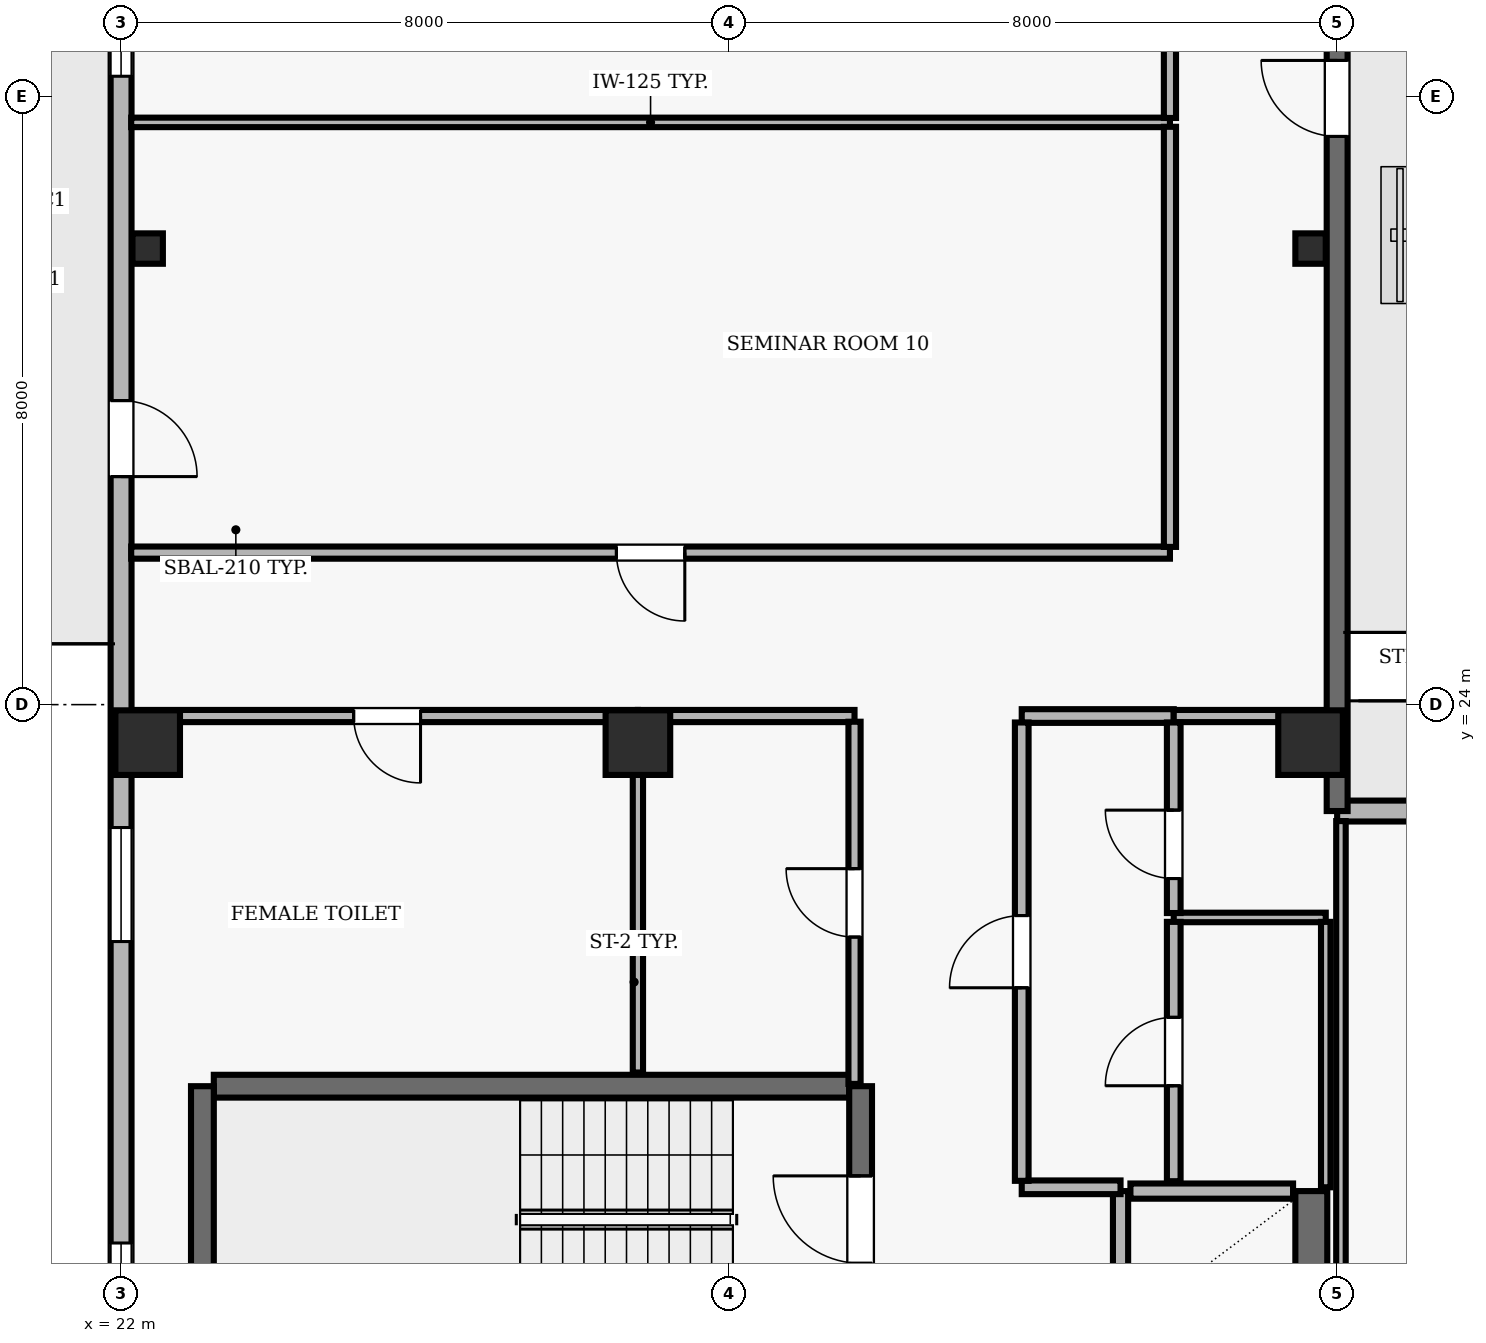
"""IFC4 building model, lengths in metres.
Left out: names, types, materials, properties, quantities, classifications, styles, units other than length and angle.
Written with IfcOpenShell. Run it as: python <this file> out.ifc"""

import sys

from ifc_helpers import new_model, si_unit, direction, frame, frame_2d, origin, origin_2d, place, context, subcontext, project, spatial, rectangle, hollow_rectangle, extrude, element, fill, save


model = new_model("IFC4")
c1 = context("Model", 3, precision=1e-05, world=origin(), true_north=direction((0.0, 1.0)))
c2 = subcontext(c1, "Body", "Model", "MODEL_VIEW")
j1 = project(units=[si_unit("LENGTHUNIT", "METRE"), si_unit("PLANEANGLEUNIT", "RADIAN")], contexts=[c1])
p1 = place(None, origin())
s1 = spatial("IfcSite", under=j1, at=p1, CompositionType="ELEMENT")
p2 = place(p1, origin())
s2 = spatial("IfcBuilding", under=s1, at=p2, CompositionType="ELEMENT")
p3 = place(p2, frame((0.0, 0.0, 267.7)))
s3 = spatial("IfcBuildingStorey", under=s2, at=p3, CompositionType="ELEMENT", Elevation=267.7)
for number, where, z_axis, x_axis in (
    (1, (22.35, 23.5, 0.0), (0.0, 0.0, 1.0), (1.0, 0.0, 0.0)),
    (2, (28.8, 23.5, 0.0), (0.0, 0.0, 1.0), (1.0, 0.0, 0.0)),
    (3, (37.65, 23.5, 0.0), (0.0, 0.0, 1.0), (1.0, 0.0, 0.0)),
):
    element("IfcColumn", number, at=place(p3, frame(where, z_axis=z_axis, x_axis=x_axis)), inside=s3, PredefinedType="COLUMN", context=c2, shape_type="SweptSolid", body=[
        extrude(rectangle(XDim=0.85, YDim=0.85, at=origin_2d()), origin(), (0.0, 0.0, 1.0), 3.9),
    ])
for number, where, z_axis, x_axis in (
    (4, (22.35, 30.0, 0.0), (0.0, 0.0, 1.0), (1.0, 0.0, 0.0)),
    (5, (37.65, 30.0, 0.0), (0.0, 0.0, 1.0), (1.0, 0.0, 0.0)),
):
    element("IfcColumn", number, at=place(p3, frame(where, z_axis=z_axis, x_axis=x_axis)), inside=s3, PredefinedType="COLUMN", context=c2, shape_type="SweptSolid", body=[
        extrude(hollow_rectangle(XDim=0.4, YDim=0.4, WallThickness=0.02, at=origin_2d()), origin(), (0.0, 0.0, 1.0), 3.9),
    ])
p4 = place(p3, frame((43.0, 22.6, 0.0), z_axis=(0.0, 0.0, 1.0), x_axis=(-1.0, 0.0, 0.0)))
e6 = element("IfcWall", 6, at=p4, inside=s3, PredefinedType="SOLIDWALL", context=c2, shape_type="SweptSolid", body=[
    extrude(rectangle(XDim=5.0, YDim=0.275, at=frame_2d((2.5, 0.0))), origin(), (0.0, 0.0, 1.0), 3.69),
])
p5 = place(p4, frame((1.825, 0.0, 0.0)))
e7 = element("IfcOpeningElement", 7, at=p5, cuts=e6, PredefinedType="OPENING", context=c2, shape_type="SweptSolid", body=[
    extrude(rectangle(XDim=1.35, YDim=2.2, at=frame_2d((0.675, 1.1))), frame((0.0, 0.147, 0.0), z_axis=(0.0, -1.0, 0.0), x_axis=(1.0, 0.0, 0.0)), (0.0, 0.0, 1.0), 0.295),
])
p6 = place(p3, frame((38.0, 22.6, 0.0), z_axis=(0.0, 0.0, 1.0), x_axis=(0.0, 1.0, 0.0)))
e8 = element("IfcWall", 8, at=p6, inside=s3, PredefinedType="SOLIDWALL", context=c2, shape_type="SweptSolid", body=[
    extrude(rectangle(XDim=12.7, YDim=0.275, at=frame_2d((6.35, 0.0))), origin(), (0.0, 0.0, 1.0), 3.69),
])
p7 = place(p6, frame((8.875, 0.0, 0.0)))
e9 = element("IfcOpeningElement", 9, at=p7, cuts=e8, PredefinedType="OPENING", context=c2, shape_type="SweptSolid", body=[
    extrude(rectangle(XDim=1.0, YDim=2.2, at=frame_2d((0.5, 1.1))), frame((0.0, 0.147, 0.0), z_axis=(0.0, -1.0, 0.0), x_axis=(1.0, 0.0, 0.0)), (0.0, 0.0, 1.0), 0.295),
])
p8 = place(p3, frame((22.0, 35.3, 0.0), z_axis=(0.0, 0.0, 1.0), x_axis=(0.0, -1.0, 0.0)))
e10 = element("IfcWall", 10, at=p8, inside=s3, PredefinedType="SOLIDWALL", context=c2, shape_type="SweptSolid", body=[
    extrude(rectangle(XDim=32.8, YDim=0.275, at=frame_2d((16.4, 0.0))), origin(), (0.0, 0.0, 1.0), 3.69),
])
p9 = place(p8, frame((7.3, 0.0, 0.0)))
e11 = element("IfcOpeningElement", 11, at=p9, cuts=e10, PredefinedType="OPENING", context=c2, shape_type="SweptSolid", body=[
    extrude(rectangle(XDim=1.0, YDim=2.2, at=frame_2d((0.5, 1.1))), frame((0.0, 0.147, 0.0), z_axis=(0.0, -1.0, 0.0), x_axis=(1.0, 0.0, 0.0)), (0.0, 0.0, 1.0), 0.295),
])
p10 = place(p8, frame((1.533, 0.0, 0.9)))
e12 = element("IfcOpeningElement", 12, at=p10, cuts=e10, PredefinedType="OPENING", context=c2, shape_type="SweptSolid", body=[
    extrude(rectangle(XDim=1.5, YDim=1.8, at=frame_2d((0.75, 0.9))), frame((0.0, 0.147, 0.0), z_axis=(0.0, -1.0, 0.0), x_axis=(1.0, 0.0, 0.0)), (0.0, 0.0, 1.0), 0.295),
])
p11 = place(p8, frame((12.917, 0.0, 0.9)))
e13 = element("IfcOpeningElement", 13, at=p11, cuts=e10, PredefinedType="OPENING", context=c2, shape_type="SweptSolid", body=[
    extrude(rectangle(XDim=1.5, YDim=1.8, at=frame_2d((0.75, 0.9))), frame((0.0, 0.147, 0.0), z_axis=(0.0, -1.0, 0.0), x_axis=(1.0, 0.0, 0.0)), (0.0, 0.0, 1.0), 0.295),
])
p12 = place(p8, frame((18.383, 0.0, 0.9)))
e14 = element("IfcOpeningElement", 14, at=p12, cuts=e10, PredefinedType="OPENING", context=c2, shape_type="SweptSolid", body=[
    extrude(rectangle(XDim=1.5, YDim=1.8, at=frame_2d((0.75, 0.9))), frame((0.0, 0.147, 0.0), z_axis=(0.0, -1.0, 0.0), x_axis=(1.0, 0.0, 0.0)), (0.0, 0.0, 1.0), 0.295),
])
p13 = place(p8, frame((23.85, 0.0, 0.9)))
e15 = element("IfcOpeningElement", 15, at=p13, cuts=e10, PredefinedType="OPENING", context=c2, shape_type="SweptSolid", body=[
    extrude(rectangle(XDim=1.5, YDim=1.8, at=frame_2d((0.75, 0.9))), frame((0.0, 0.147, 0.0), z_axis=(0.0, -1.0, 0.0), x_axis=(1.0, 0.0, 0.0)), (0.0, 0.0, 1.0), 0.295),
])
p14 = place(p3, frame((31.58, 18.98, 0.0), z_axis=(0.0, 0.0, 1.0), x_axis=(-1.0, 0.0, 0.0)))
e16 = element("IfcWall", 16, at=p14, inside=s3, PredefinedType="SHEAR", context=c2, shape_type="SweptSolid", body=[
    extrude(rectangle(XDim=8.36, YDim=0.3, at=frame_2d((4.18, 0.0))), origin(), (0.0, 0.0, 1.0), 3.69),
])
p15 = place(p3, frame((23.07, 18.98, 0.0), z_axis=(0.0, 0.0, 1.0), x_axis=(0.0, -1.0, 0.0)))
e17 = element("IfcWall", 17, at=p15, inside=s3, PredefinedType="SHEAR", context=c2, shape_type="SweptSolid", body=[
    extrude(rectangle(XDim=3.51, YDim=0.3, at=frame_2d((1.755, 0.0))), origin(), (0.0, 0.0, 1.0), 3.69),
])
p16 = place(p3, frame((31.73, 15.47, 0.0), z_axis=(0.0, 0.0, 1.0), x_axis=(0.0, 1.0, 0.0)))
e18 = element("IfcWall", 18, at=p16, inside=s3, PredefinedType="SHEAR", context=c2, shape_type="SweptSolid", body=[
    extrude(rectangle(XDim=3.51, YDim=0.3, at=frame_2d((1.755, 0.0))), origin(), (0.0, 0.0, 1.0), 3.69),
])
p17 = place(p16, frame((1.18, 0.0, 0.0)))
e19 = element("IfcOpeningElement", 19, at=p17, cuts=e18, PredefinedType="OPENING", context=c2, shape_type="SweptSolid", body=[
    extrude(rectangle(XDim=1.15, YDim=2.15, at=frame_2d((0.575, 1.075))), frame((0.0, 0.16, 0.0), z_axis=(0.0, -1.0, 0.0), x_axis=(1.0, 0.0, 0.0)), (0.0, 0.0, 1.0), 0.32),
])
p18 = place(p3, frame((35.15, 17.6, 0.0), z_axis=(0.0, 0.0, 1.0), x_axis=(0.0, -1.0, 0.0)))
e20 = element("IfcWall", 20, at=p18, inside=s3, PredefinedType="SOLIDWALL", context=c2, shape_type="SweptSolid", body=[
    extrude(rectangle(XDim=1.85, YDim=0.2, at=frame_2d((0.925, 0.0))), origin(), (0.0, 0.0, 1.0), 3.69),
])
p19 = place(p3, frame((37.66, 15.75, 0.0), z_axis=(0.0, 0.0, 1.0), x_axis=(0.0, 1.0, 0.0)))
e21 = element("IfcWall", 21, at=p19, inside=s3, PredefinedType="SHEAR", context=c2, shape_type="SweptSolid", body=[
    extrude(rectangle(XDim=1.85, YDim=0.42, at=frame_2d((0.925, 0.0))), origin(), (0.0, 0.0, 1.0), 3.69),
])
p20 = place(p3, frame((37.42, 17.6, 0.0), z_axis=(0.0, 0.0, 1.0), x_axis=(-1.0, 0.0, 0.0)))
e22 = element("IfcWall", 22, at=p20, inside=s3, PredefinedType="SOLIDWALL", context=c2, shape_type="SweptSolid", body=[
    extrude(rectangle(XDim=2.14, YDim=0.2, at=frame_2d((1.07, 0.0))), origin(), (0.0, 0.0, 1.0), 3.69),
])
p21 = place(p3, frame((28.8, 23.85, 0.0), z_axis=(0.0, 0.0, 1.0), x_axis=(-1.0, 0.0, 0.0)))
e23 = element("IfcWall", 23, at=p21, inside=s3, PredefinedType="PARTITIONING", context=c2, shape_type="SweptSolid", body=[
    extrude(rectangle(XDim=6.6, YDim=0.16, at=frame_2d((3.3, 0.0))), origin(), (0.0, 0.0, 1.0), 3.227),
])
p22 = place(p21, frame((2.86, 0.0, 0.0)))
e24 = element("IfcOpeningElement", 24, at=p22, cuts=e23, PredefinedType="OPENING", context=c2, shape_type="SweptSolid", body=[
    extrude(rectangle(XDim=0.88, YDim=2.1, at=frame_2d((0.44, 1.05))), frame((0.0, 0.09, 0.0), z_axis=(0.0, -1.0, 0.0), x_axis=(1.0, 0.0, 0.0)), (0.0, 0.0, 1.0), 0.18),
])
p23 = place(p3, frame((31.65, 23.85, 0.0), z_axis=(0.0, 0.0, 1.0), x_axis=(-1.0, 0.0, 0.0)))
e25 = element("IfcWall", 25, at=p23, inside=s3, PredefinedType="PARTITIONING", context=c2, shape_type="SweptSolid", body=[
    extrude(rectangle(XDim=2.85, YDim=0.16, at=frame_2d((1.425, 0.0))), origin(), (0.0, 0.0, 1.0), 3.227),
])
p24 = place(p3, frame((33.85, 17.65, 0.0), z_axis=(0.0, 0.0, 1.0), x_axis=(1.0, 0.0, 0.0)))
e26 = element("IfcWall", 26, at=p24, inside=s3, PredefinedType="PARTITIONING", context=c2, shape_type="SweptSolid", body=[
    extrude(rectangle(XDim=1.3, YDim=0.18, at=frame_2d((0.65, 0.0))), origin(), (0.0, 0.0, 1.0), 3.69),
])
p25 = place(p3, frame((35.8, 26.0, 0.0), z_axis=(0.0, 0.0, 1.0), x_axis=(-1.0, 0.0, 0.0)))
e27 = element("IfcWall", 27, at=p25, inside=s3, PredefinedType="PARTITIONING", context=c2, shape_type="SweptSolid", body=[
    extrude(rectangle(XDim=13.667, YDim=0.16, at=frame_2d((6.833, 0.0))), origin(), (0.0, 0.0, 1.0), 3.69),
])
p26 = place(p25, frame((6.383, 0.0, 0.0)))
e28 = element("IfcOpeningElement", 28, at=p26, cuts=e27, PredefinedType="OPENING", context=c2, shape_type="SweptSolid", body=[
    extrude(rectangle(XDim=0.9, YDim=2.1, at=frame_2d((0.45, 1.05))), frame((0.0, 0.09, 0.0), z_axis=(0.0, -1.0, 0.0), x_axis=(1.0, 0.0, 0.0)), (0.0, 0.0, 1.0), 0.18),
])
p27 = place(p3, frame((35.8, 31.66, 0.0), z_axis=(0.0, 0.0, 1.0), x_axis=(-1.0, 0.0, 0.0)))
e29 = element("IfcWall", 29, at=p27, inside=s3, PredefinedType="PARTITIONING", context=c2, shape_type="SweptSolid", body=[
    extrude(rectangle(XDim=13.667, YDim=0.125, at=frame_2d((6.833, 0.0))), origin(), (0.0, 0.0, 1.0), 3.69),
])
p28 = place(p3, frame((35.85, 21.2, 0.0), z_axis=(0.0, 0.0, 1.0), x_axis=(1.0, 0.0, 0.0)))
e30 = element("IfcWall", 30, at=p28, inside=s3, PredefinedType="PARTITIONING", context=c2, shape_type="SweptSolid", body=[
    extrude(rectangle(XDim=2.0, YDim=0.125, at=frame_2d((1.0, 0.0))), origin(), (0.0, 0.0, 1.0), 3.69),
])
p29 = place(p3, frame((35.85, 23.85, 0.0), z_axis=(0.0, 0.0, 1.0), x_axis=(-1.0, 0.0, 0.0)))
e31 = element("IfcWall", 31, at=p29, inside=s3, PredefinedType="PARTITIONING", context=c2, shape_type="SweptSolid", body=[
    extrude(rectangle(XDim=2.0, YDim=0.18, at=frame_2d((1.0, 0.0))), origin(), (0.0, 0.0, 1.0), 3.227),
])
p30 = place(p3, frame((37.85, 23.85, 0.0), z_axis=(0.0, 0.0, 1.0), x_axis=(-1.0, 0.0, 0.0)))
e32 = element("IfcWall", 32, at=p30, inside=s3, PredefinedType="PARTITIONING", context=c2, shape_type="SweptSolid", body=[
    extrude(rectangle(XDim=2.0, YDim=0.16, at=frame_2d((1.0, 0.0))), origin(), (0.0, 0.0, 1.0), 3.227),
])
p31 = place(p3, frame((28.8, 23.775, 0.0), z_axis=(0.0, 0.0, 1.0), x_axis=(0.0, -1.0, 0.0)))
e33 = element("IfcWall", 33, at=p31, inside=s3, PredefinedType="PARTITIONING", context=c2, shape_type="SweptSolid", body=[
    extrude(rectangle(XDim=4.615, YDim=0.135, at=frame_2d((2.308, 0.0))), origin(), (0.0, 0.0, 1.0), 3.69),
])
p32 = place(p3, frame((31.65, 19.01, 0.0), z_axis=(0.0, 0.0, 1.0), x_axis=(0.0, 1.0, 0.0)))
e34 = element("IfcWall", 34, at=p32, inside=s3, PredefinedType="PARTITIONING", context=c2, shape_type="SweptSolid", body=[
    extrude(rectangle(XDim=4.765, YDim=0.16, at=frame_2d((2.382, 0.0))), origin(), (0.0, 0.0, 1.0), 3.69),
])
p33 = place(p32, frame((1.932, 0.0, 0.0)))
e35 = element("IfcOpeningElement", 35, at=p33, cuts=e34, PredefinedType="OPENING", context=c2, shape_type="SweptSolid", body=[
    extrude(rectangle(XDim=0.9, YDim=2.1, at=frame_2d((0.45, 1.05))), frame((0.0, 0.09, 0.0), z_axis=(0.0, -1.0, 0.0), x_axis=(1.0, 0.0, 0.0)), (0.0, 0.0, 1.0), 0.18),
])
p34 = place(p3, frame((33.85, 17.735, 0.0), z_axis=(0.0, 0.0, 1.0), x_axis=(0.0, 1.0, 0.0)))
e36 = element("IfcWall", 36, at=p34, inside=s3, PredefinedType="PARTITIONING", context=c2, shape_type="SweptSolid", body=[
    extrude(rectangle(XDim=6.03, YDim=0.18, at=frame_2d((3.015, 0.0))), origin(), (0.0, 0.0, 1.0), 3.69),
])
p35 = place(p34, frame((2.54, 0.0, 0.0)))
e37 = element("IfcOpeningElement", 37, at=p35, cuts=e36, PredefinedType="OPENING", context=c2, shape_type="SweptSolid", body=[
    extrude(rectangle(XDim=0.95, YDim=2.1, at=frame_2d((0.475, 1.05))), frame((0.0, 0.1, 0.0), z_axis=(0.0, -1.0, 0.0), x_axis=(1.0, 0.0, 0.0)), (0.0, 0.0, 1.0), 0.2),
])
p36 = place(p3, frame((35.8, 31.602, 0.0), z_axis=(0.0, 0.0, 1.0), x_axis=(0.0, -1.0, 0.0)))
e38 = element("IfcWall", 38, at=p36, inside=s3, PredefinedType="PARTITIONING", context=c2, shape_type="SweptSolid", body=[
    extrude(rectangle(XDim=5.527, YDim=0.16, at=frame_2d((2.764, 0.0))), origin(), (0.0, 0.0, 1.0), 3.69),
])
p37 = place(p3, frame((35.8, 37.313, 0.0), z_axis=(0.0, 0.0, 1.0), x_axis=(0.0, -1.0, 0.0)))
e39 = element("IfcWall", 39, at=p37, inside=s3, PredefinedType="PARTITIONING", context=c2, shape_type="SweptSolid", body=[
    extrude(rectangle(XDim=5.595, YDim=0.16, at=frame_2d((2.797, 0.0))), origin(), (0.0, 0.0, 1.0), 3.69),
])
p38 = place(p37, frame((2.348, 0.0, 0.0)))
e40 = element("IfcOpeningElement", 40, at=p38, cuts=e39, PredefinedType="OPENING", context=c2, shape_type="SweptSolid", body=[
    extrude(rectangle(XDim=0.9, YDim=2.1, at=frame_2d((0.45, 1.05))), frame((0.0, 0.09, 0.0), z_axis=(0.0, -1.0, 0.0), x_axis=(1.0, 0.0, 0.0)), (0.0, 0.0, 1.0), 0.18),
])
p39 = place(p3, frame((35.85, 17.73, 0.0), z_axis=(0.0, 0.0, 1.0), x_axis=(0.0, 1.0, 0.0)))
e41 = element("IfcWall", 41, at=p39, inside=s3, PredefinedType="PARTITIONING", context=c2, shape_type="SweptSolid", body=[
    extrude(rectangle(XDim=3.412, YDim=0.18, at=frame_2d((1.706, 0.0))), origin(), (0.0, 0.0, 1.0), 3.69),
])
p40 = place(p39, frame((1.256, 0.0, 0.0)))
e42 = element("IfcOpeningElement", 42, at=p40, cuts=e41, PredefinedType="OPENING", context=c2, shape_type="SweptSolid", body=[
    extrude(rectangle(XDim=0.9, YDim=2.1, at=frame_2d((0.45, 1.05))), frame((0.0, 0.1, 0.0), z_axis=(0.0, -1.0, 0.0), x_axis=(1.0, 0.0, 0.0)), (0.0, 0.0, 1.0), 0.2),
])
p41 = place(p3, frame((35.85, 21.258, 0.0), z_axis=(0.0, 0.0, 1.0), x_axis=(0.0, 1.0, 0.0)))
e43 = element("IfcWall", 43, at=p41, inside=s3, PredefinedType="PARTITIONING", context=c2, shape_type="SweptSolid", body=[
    extrude(rectangle(XDim=2.507, YDim=0.18, at=frame_2d((1.253, 0.0))), origin(), (0.0, 0.0, 1.0), 3.69),
])
p42 = place(p41, frame((0.454, 0.0, 0.0)))
e44 = element("IfcOpeningElement", 44, at=p42, cuts=e43, PredefinedType="OPENING", context=c2, shape_type="SweptSolid", body=[
    extrude(rectangle(XDim=0.9, YDim=2.1, at=frame_2d((0.45, 1.05))), frame((0.0, 0.1, 0.0), z_axis=(0.0, -1.0, 0.0), x_axis=(1.0, 0.0, 0.0)), (0.0, 0.0, 1.0), 0.2),
])
p43 = place(p3, frame((37.85, 17.65, 0.0), z_axis=(0.0, 0.0, 1.0), x_axis=(0.0, 1.0, 0.0)))
e45 = element("IfcWall", 45, at=p43, inside=s3, PredefinedType="PARTITIONING", context=c2, shape_type="SweptSolid", body=[
    extrude(rectangle(XDim=3.492, YDim=0.125, at=frame_2d((1.746, 0.0))), origin(), (0.0, 0.0, 1.0), 3.227),
])
p44 = place(p3, frame((38.05, 22.468, 0.0), z_axis=(0.0, 0.0, 1.0), x_axis=(0.0, -1.0, 0.0)))
e46 = element("IfcWall", 46, at=p44, inside=s3, PredefinedType="PARTITIONING", context=c2, shape_type="SweptSolid", body=[
    extrude(rectangle(XDim=6.393, YDim=0.125, at=frame_2d((3.197, 0.0))), origin(), (0.0, 0.0, 1.0), 3.227),
])
p45 = place(p7, origin())
e47 = element("IfcDoor", 47, at=p45, inside=s3, OperationType="SINGLE_SWING_RIGHT", PredefinedType="DOOR", context=c2, shape_type="SweptSolid", body=[
    extrude(rectangle(XDim=1.0, YDim=2.2, at=frame_2d((0.5, 1.1))), frame((0.0, 0.025, 0.0), z_axis=(0.0, -1.0, 0.0), x_axis=(1.0, 0.0, 0.0)), (0.0, 0.0, 1.0), 0.05),
])
fill(e9, e47)
p46 = place(p9, origin())
e48 = element("IfcDoor", 48, at=p46, inside=s3, OperationType="SINGLE_SWING_RIGHT", PredefinedType="DOOR", context=c2, shape_type="SweptSolid", body=[
    extrude(rectangle(XDim=1.0, YDim=2.2, at=frame_2d((0.5, 1.1))), frame((0.0, 0.025, 0.0), z_axis=(0.0, -1.0, 0.0), x_axis=(1.0, 0.0, 0.0)), (0.0, 0.0, 1.0), 0.05),
])
fill(e11, e48)
p47 = place(p10, origin())
e49 = element("IfcWindow", 49, at=p47, inside=s3, PartitioningType="SINGLE_PANEL", PredefinedType="WINDOW", context=c2, shape_type="SweptSolid", body=[
    extrude(rectangle(XDim=1.5, YDim=1.8, at=frame_2d((0.75, 0.9))), frame((0.0, 0.03, 0.0), z_axis=(0.0, -1.0, 0.0), x_axis=(1.0, 0.0, 0.0)), (0.0, 0.0, 1.0), 0.06),
])
fill(e12, e49)
p48 = place(p11, origin())
e50 = element("IfcWindow", 50, at=p48, inside=s3, PartitioningType="SINGLE_PANEL", PredefinedType="WINDOW", context=c2, shape_type="SweptSolid", body=[
    extrude(rectangle(XDim=1.5, YDim=1.8, at=frame_2d((0.75, 0.9))), frame((0.0, 0.03, 0.0), z_axis=(0.0, -1.0, 0.0), x_axis=(1.0, 0.0, 0.0)), (0.0, 0.0, 1.0), 0.06),
])
fill(e13, e50)
p49 = place(p12, origin())
e51 = element("IfcWindow", 51, at=p49, inside=s3, PartitioningType="SINGLE_PANEL", PredefinedType="WINDOW", context=c2, shape_type="SweptSolid", body=[
    extrude(rectangle(XDim=1.5, YDim=1.8, at=frame_2d((0.75, 0.9))), frame((0.0, 0.03, 0.0), z_axis=(0.0, -1.0, 0.0), x_axis=(1.0, 0.0, 0.0)), (0.0, 0.0, 1.0), 0.06),
])
fill(e14, e51)
p50 = place(p17, origin())
e52 = element("IfcDoor", 52, at=p50, inside=s3, OperationType="SINGLE_SWING_RIGHT", PredefinedType="DOOR", context=c2, shape_type="SweptSolid", body=[
    extrude(rectangle(XDim=1.15, YDim=2.15, at=frame_2d((0.575, 1.075))), frame((0.0, 0.025, 0.0), z_axis=(0.0, -1.0, 0.0), x_axis=(1.0, 0.0, 0.0)), (0.0, 0.0, 1.0), 0.05),
])
fill(e19, e52)
p51 = place(p35, origin())
e53 = element("IfcDoor", 53, at=p51, inside=s3, OperationType="SINGLE_SWING_LEFT", PredefinedType="DOOR", context=c2, shape_type="SweptSolid", body=[
    extrude(rectangle(XDim=0.95, YDim=2.1, at=frame_2d((0.475, 1.05))), frame((0.0, 0.025, 0.0), z_axis=(0.0, -1.0, 0.0), x_axis=(1.0, 0.0, 0.0)), (0.0, 0.0, 1.0), 0.05),
])
fill(e37, e53)
p52 = place(p42, origin())
e54 = element("IfcDoor", 54, at=p52, inside=s3, OperationType="SINGLE_SWING_RIGHT", PredefinedType="DOOR", context=c2, shape_type="SweptSolid", body=[
    extrude(rectangle(XDim=0.9, YDim=2.1, at=frame_2d((0.45, 1.05))), frame((0.0, 0.025, 0.0), z_axis=(0.0, -1.0, 0.0), x_axis=(1.0, 0.0, 0.0)), (0.0, 0.0, 1.0), 0.05),
])
fill(e44, e54)
p53 = place(p40, origin())
e55 = element("IfcDoor", 55, at=p53, inside=s3, OperationType="SINGLE_SWING_LEFT", PredefinedType="DOOR", context=c2, shape_type="SweptSolid", body=[
    extrude(rectangle(XDim=0.9, YDim=2.1, at=frame_2d((0.45, 1.05))), frame((0.0, 0.025, 0.0), z_axis=(0.0, -1.0, 0.0), x_axis=(1.0, 0.0, 0.0)), (0.0, 0.0, 1.0), 0.05),
])
fill(e42, e55)
p54 = place(p33, origin())
e56 = element("IfcDoor", 56, at=p54, inside=s3, OperationType="SINGLE_SWING_RIGHT", PredefinedType="DOOR", context=c2, shape_type="SweptSolid", body=[
    extrude(rectangle(XDim=0.9, YDim=2.1, at=frame_2d((0.45, 1.05))), frame((0.0, 0.025, 0.0), z_axis=(0.0, -1.0, 0.0), x_axis=(1.0, 0.0, 0.0)), (0.0, 0.0, 1.0), 0.05),
])
fill(e35, e56)
p55 = place(p22, origin())
e57 = element("IfcDoor", 57, at=p55, inside=s3, OperationType="SINGLE_SWING_LEFT", PredefinedType="DOOR", context=c2, shape_type="SweptSolid", body=[
    extrude(rectangle(XDim=0.88, YDim=2.1, at=frame_2d((0.44, 1.05))), frame((0.0, 0.025, 0.0), z_axis=(0.0, -1.0, 0.0), x_axis=(1.0, 0.0, 0.0)), (0.0, 0.0, 1.0), 0.05),
])
fill(e24, e57)
p56 = place(p26, origin())
e58 = element("IfcDoor", 58, at=p56, inside=s3, OperationType="SINGLE_SWING_LEFT", PredefinedType="DOOR", context=c2, shape_type="SweptSolid", body=[
    extrude(rectangle(XDim=0.9, YDim=2.1, at=frame_2d((0.45, 1.05))), frame((0.0, 0.025, 0.0), z_axis=(0.0, -1.0, 0.0), x_axis=(1.0, 0.0, 0.0)), (0.0, 0.0, 1.0), 0.05),
])
fill(e28, e58)
save(model, sys.argv[1])
